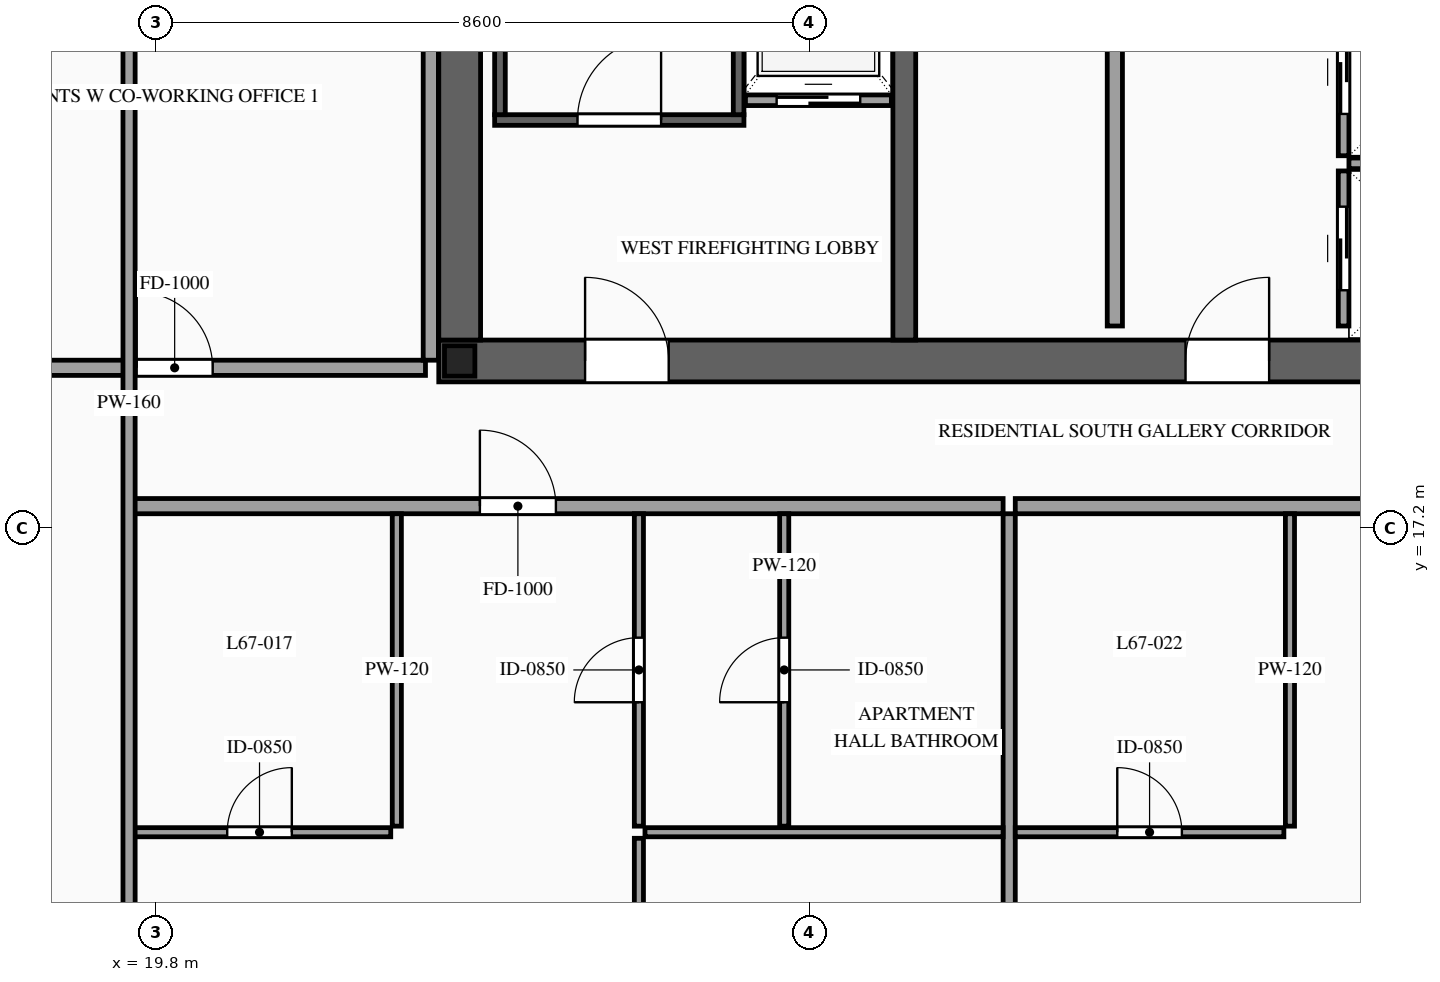
"""IFC4 building model, lengths in metres.
Left out: names, types, materials, properties, quantities, classifications, styles, units other than length and angle.
Written with IfcOpenShell. Run it as: python <this file> out.ifc"""

import sys

from ifc_helpers import new_model, si_unit, direction, frame, frame_2d, origin, origin_2d, place, context, subcontext, project, spatial, rectangle, i_section, extrude, source, transform, mapped, element, fill, save


model = new_model("IFC4")
c1 = context("Model", 3, precision=1e-05, world=origin(), true_north=direction((0.0, 1.0)))
c2 = subcontext(c1, "Body", "Model", "MODEL_VIEW")
j1 = project(units=[si_unit("LENGTHUNIT", "METRE"), si_unit("PLANEANGLEUNIT", "RADIAN")], contexts=[c1])
p1 = place(None, origin())
s1 = spatial("IfcSite", under=j1, at=p1, CompositionType="ELEMENT")
p2 = place(p1, origin())
s2 = spatial("IfcBuilding", under=s1, at=p2, CompositionType="ELEMENT")
p3 = place(p2, frame((0.0, 0.0, 252.1)))
s3 = spatial("IfcBuildingStorey", under=s2, at=p3, CompositionType="ELEMENT", Elevation=252.1)
p4 = place(p3, frame((23.525, 19.4, 0.0), z_axis=(0.0, 0.0, 1.0), x_axis=(1.0, 0.0, 0.0)))
e1 = element("IfcWall", 1, at=p4, inside=s3, PredefinedType="SHEAR", context=c2, shape_type="SweptSolid", body=[
    extrude(rectangle(XDim=26.95, YDim=0.55, at=frame_2d((13.475, 0.0))), origin(), (0.0, 0.0, 1.0), 3.5),
])
p5 = place(p4, frame((1.925, 0.0, 0.0)))
e2 = element("IfcOpeningElement", 2, at=p5, cuts=e1, PredefinedType="OPENING", context=c2, shape_type="SweptSolid", body=[
    extrude(rectangle(XDim=1.1, YDim=2.2, at=frame_2d((0.55, 1.1))), frame((0.0, 0.29, 0.0), z_axis=(0.0, -1.0, 0.0), x_axis=(1.0, 0.0, 0.0)), (0.0, 0.0, 1.0), 0.58),
])
p6 = place(p4, frame((9.825, 0.0, 0.0)))
e3 = element("IfcOpeningElement", 3, at=p6, cuts=e1, PredefinedType="OPENING", context=c2, shape_type="SweptSolid", body=[
    extrude(rectangle(XDim=1.1, YDim=2.2, at=frame_2d((0.55, 1.1))), frame((0.0, 0.29, 0.0), z_axis=(0.0, -1.0, 0.0), x_axis=(1.0, 0.0, 0.0)), (0.0, 0.0, 1.0), 0.58),
])
p7 = place(p4, frame((23.025, 0.0, 0.0)))
e4 = element("IfcOpeningElement", 4, at=p7, cuts=e1, PredefinedType="OPENING", context=c2, shape_type="SweptSolid", body=[
    extrude(rectangle(XDim=1.1, YDim=2.2, at=frame_2d((0.55, 1.1))), frame((0.0, 0.29, 0.0), z_axis=(0.0, -1.0, 0.0), x_axis=(1.0, 0.0, 0.0)), (0.0, 0.0, 1.0), 0.58),
])
p8 = place(p4, frame((19.645, 0.0, 0.0)))
e5 = element("IfcOpeningElement", 5, at=p8, cuts=e1, PredefinedType="OPENING", context=c2, shape_type="SweptSolid", body=[
    extrude(rectangle(XDim=0.9, YDim=2.15, at=frame_2d((0.45, 1.075))), frame((0.0, 0.29, 0.0), z_axis=(0.0, -1.0, 0.0), x_axis=(1.0, 0.0, 0.0)), (0.0, 0.0, 1.0), 0.58),
])
p9 = place(p4, frame((18.205, 0.0, 0.0)))
e6 = element("IfcOpeningElement", 6, at=p9, cuts=e1, PredefinedType="OPENING", context=c2, shape_type="SweptSolid", body=[
    extrude(rectangle(XDim=0.9, YDim=2.15, at=frame_2d((0.45, 1.075))), frame((0.0, 0.29, 0.0), z_axis=(0.0, -1.0, 0.0), x_axis=(1.0, 0.0, 0.0)), (0.0, 0.0, 1.0), 0.58),
])
m1 = source(origin(), c2, "Body", "SweptSolid", [
    extrude(rectangle(XDim=12.25, YDim=0.55, at=frame_2d((6.125, 0.0))), origin(), (0.0, 0.0, 1.0), 3.5),
])
p10 = place(p3, frame((23.8, 19.675, 0.0), z_axis=(0.0, 0.0, 1.0), x_axis=(0.0, 1.0, 0.0)))
e7 = element("IfcWall", 7, at=p10, inside=s3, PredefinedType="SHEAR", context=c2, shape_type="MappedRepresentation", body=[
    mapped(m1, transform((0.0, 0.0, 0.0), scale=1.0)),
])
m2 = source(origin(), c2, "Body", "SweptSolid", [
    extrude(rectangle(XDim=12.25, YDim=0.3, at=frame_2d((6.125, 0.0))), origin(), (0.0, 0.0, 1.0), 3.5),
])
p11 = place(p3, frame((29.65, 19.675, 0.0), z_axis=(0.0, 0.0, 1.0), x_axis=(0.0, 1.0, 0.0)))
e8 = element("IfcWall", 8, at=p11, inside=s3, PredefinedType="SOLIDWALL", context=c2, shape_type="MappedRepresentation", body=[
    mapped(m2, transform((0.0, 0.0, 0.0), scale=1.0)),
])
m3 = source(origin(), c2, "Body", "SweptSolid", [
    extrude(i_section(OverallWidth=0.4, OverallDepth=0.4, WebThickness=0.013, FlangeThickness=0.021, at=origin_2d()), origin(), (0.0, 0.0, 1.0), 3.5),
])
p12 = place(p3, frame((23.8, 19.4, 0.0), z_axis=(0.0, 0.0, 1.0), x_axis=(1.0, 0.0, 0.0)))
e9 = element("IfcColumn", 9, at=p12, inside=s3, PredefinedType="COLUMN", context=c2, shape_type="MappedRepresentation", body=[
    mapped(m3, transform((0.0, 0.0, 0.0), scale=1.0)),
])
p13 = place(p3, frame((27.56, 22.83, 0.0), z_axis=(0.0, 0.0, 1.0), x_axis=(1.0, 0.0, 0.0)))
e10 = element("IfcWall", 10, at=p13, inside=s3, PredefinedType="SOLIDWALL", context=c2, shape_type="SweptSolid", body=[
    extrude(rectangle(XDim=1.92, YDim=0.14, at=frame_2d((0.96, 0.0))), origin(), (0.0, 0.0, 1.0), 3.28),
])
p14 = place(p13, frame((0.41, 0.0, 0.0)))
e11 = element("IfcOpeningElement", 11, at=p14, cuts=e10, PredefinedType="OPENING", context=c2, shape_type="SweptSolid", body=[
    extrude(rectangle(XDim=1.1, YDim=2.2, at=frame_2d((0.55, 1.1))), frame((0.0, 0.085, 0.0), z_axis=(0.0, -1.0, 0.0), x_axis=(1.0, 0.0, 0.0)), (0.0, 0.0, 1.0), 0.17),
])
p15 = place(p3, frame((35.43, 19.86, 0.0), z_axis=(0.0, 0.0, 1.0), x_axis=(0.0, 1.0, 0.0)))
e12 = element("IfcWall", 12, at=p15, inside=s3, PredefinedType="SOLIDWALL", context=c2, shape_type="SweptSolid", body=[
    extrude(rectangle(XDim=2.04, YDim=0.14, at=frame_2d((1.02, 0.0))), origin(), (0.0, 0.0, 1.0), 3.28),
])
p16 = place(p15, frame((0.47, 0.0, 0.0)))
e13 = element("IfcOpeningElement", 13, at=p16, cuts=e12, PredefinedType="OPENING", context=c2, shape_type="SweptSolid", body=[
    extrude(rectangle(XDim=1.1, YDim=2.2, at=frame_2d((0.55, 1.1))), frame((0.0, 0.085, 0.0), z_axis=(0.0, -1.0, 0.0), x_axis=(1.0, 0.0, 0.0)), (0.0, 0.0, 1.0), 0.17),
])
m4 = source(origin(), c2, "Body", "SweptSolid", [
    extrude(rectangle(XDim=2.4, YDim=0.14, at=frame_2d((1.2, 0.0))), origin(), (0.0, 0.0, 1.0), 3.28),
])
p17 = place(p3, frame((35.5, 22.0, 0.0), z_axis=(0.0, 0.0, 1.0), x_axis=(1.0, 0.0, 0.0)))
e14 = element("IfcWall", 14, at=p17, inside=s3, PredefinedType="SOLIDWALL", context=c2, shape_type="MappedRepresentation", body=[
    mapped(m4, transform((0.0, 0.0, 0.0), scale=1.0)),
])
p18 = place(p3, frame((35.43, 22.1, 0.0), z_axis=(0.0, 0.0, 1.0), x_axis=(0.0, 1.0, 0.0)))
e15 = element("IfcWall", 15, at=p18, inside=s3, PredefinedType="SOLIDWALL", context=c2, shape_type="SweptSolid", body=[
    extrude(rectangle(XDim=2.2, YDim=0.14, at=frame_2d((1.1, 0.0))), origin(), (0.0, 0.0, 1.0), 3.28),
])
p19 = place(p18, frame((0.55, 0.0, 0.0)))
e16 = element("IfcOpeningElement", 16, at=p19, cuts=e15, PredefinedType="OPENING", context=c2, shape_type="SweptSolid", body=[
    extrude(rectangle(XDim=1.1, YDim=2.2, at=frame_2d((0.55, 1.1))), frame((0.0, 0.085, 0.0), z_axis=(0.0, -1.0, 0.0), x_axis=(1.0, 0.0, 0.0)), (0.0, 0.0, 1.0), 0.17),
])
p20 = place(p3, frame((24.26, 22.57, 0.0), z_axis=(0.0, 0.0, 1.0), x_axis=(1.0, 0.0, 0.0)))
e17 = element("IfcWall", 17, at=p20, inside=s3, PredefinedType="SOLIDWALL", context=c2, shape_type="SweptSolid", body=[
    extrude(rectangle(XDim=3.28, YDim=0.14, at=frame_2d((1.64, 0.0))), origin(), (0.0, 0.0, 1.0), 3.28),
])
p21 = place(p20, frame((1.09, 0.0, 0.0)))
e18 = element("IfcOpeningElement", 18, at=p21, cuts=e17, PredefinedType="OPENING", context=c2, shape_type="SweptSolid", body=[
    extrude(rectangle(XDim=1.1, YDim=2.2, at=frame_2d((0.55, 1.1))), frame((0.0, 0.085, 0.0), z_axis=(0.0, -1.0, 0.0), x_axis=(1.0, 0.0, 0.0)), (0.0, 0.0, 1.0), 0.17),
])
m5 = source(origin(), c2, "Body", "SweptSolid", [
    extrude(rectangle(XDim=8.94, YDim=0.14, at=frame_2d((4.47, 0.0))), origin(), (0.0, 0.0, 1.0), 3.28),
])
for number, where, z_axis, x_axis in (
    (19, (24.33, 22.64, 0.0), (0.0, 0.0, 1.0), (0.0, 1.0, 0.0)),
    (20, (27.47, 22.64, 0.0), (0.0, 0.0, 1.0), (0.0, 1.0, 0.0)),
):
    element("IfcWall", number, at=place(p3, frame(where, z_axis=z_axis, x_axis=x_axis)), inside=s3, PredefinedType="SOLIDWALL", context=c2, shape_type="MappedRepresentation", body=[
        mapped(m5, transform((0.0, 0.0, 0.0), scale=1.0)),
    ])
p22 = place(p3, frame((32.42, 19.86, 0.0), z_axis=(0.0, 0.0, 1.0), x_axis=(0.0, 1.0, 0.0)))
e21 = element("IfcWall", 21, at=p22, inside=s3, PredefinedType="PARTITIONING", context=c2, shape_type="SweptSolid", body=[
    extrude(rectangle(XDim=11.88, YDim=0.2, at=frame_2d((5.94, 0.0))), origin(), (0.0, 0.0, 1.0), 3.28),
])
p23 = place(p22, frame((5.49, 0.0, 0.0)))
e22 = element("IfcOpeningElement", 22, at=p23, cuts=e21, PredefinedType="OPENING", context=c2, shape_type="SweptSolid", body=[
    extrude(rectangle(XDim=0.9, YDim=2.15, at=frame_2d((0.45, 1.075))), frame((0.0, 0.115, 0.0), z_axis=(0.0, -1.0, 0.0), x_axis=(1.0, 0.0, 0.0)), (0.0, 0.0, 1.0), 0.23),
])
p24 = place(p3, frame((19.44, 17.49, 0.0), z_axis=(0.0, 0.0, 1.0), x_axis=(1.0, 0.0, 0.0)))
e23 = element("IfcWall", 23, at=p24, inside=s3, PredefinedType="PARTITIONING", context=c2, shape_type="SweptSolid", body=[
    extrude(rectangle(XDim=11.51, YDim=0.2, at=frame_2d((5.755, 0.0))), origin(), (0.0, 0.0, 1.0), 3.28),
])
p25 = place(p24, frame((4.626, 0.0, 0.0)))
e24 = element("IfcOpeningElement", 24, at=p25, cuts=e23, PredefinedType="OPENING", context=c2, shape_type="SweptSolid", body=[
    extrude(rectangle(XDim=1.0, YDim=2.2, at=frame_2d((0.5, 1.1))), frame((0.0, 0.115, 0.0), z_axis=(0.0, -1.0, 0.0), x_axis=(1.0, 0.0, 0.0)), (0.0, 0.0, 1.0), 0.23),
])
m6 = source(origin(), c2, "Body", "SweptSolid", [
    extrude(rectangle(XDim=12.04, YDim=0.16, at=frame_2d((6.02, 0.0))), origin(), (0.0, 0.0, 1.0), 3.28),
])
p26 = place(p3, frame((31.03, 5.35, 0.0), z_axis=(0.0, 0.0, 1.0), x_axis=(0.0, 1.0, 0.0)))
e25 = element("IfcWall", 25, at=p26, inside=s3, PredefinedType="PARTITIONING", context=c2, shape_type="MappedRepresentation", body=[
    mapped(m6, transform((0.0, 0.0, 0.0), scale=1.0)),
])
p27 = place(p3, frame((19.44, 13.2, 0.0), z_axis=(0.0, 0.0, 1.0), x_axis=(1.0, 0.0, 0.0)))
e26 = element("IfcWall", 26, at=p27, inside=s3, PredefinedType="PARTITIONING", context=c2, shape_type="SweptSolid", body=[
    extrude(rectangle(XDim=3.453, YDim=0.12, at=frame_2d((1.727, 0.0))), origin(), (0.0, 0.0, 1.0), 3.28),
])
p28 = place(p27, frame((1.302, 0.0, 0.0)))
e27 = element("IfcOpeningElement", 27, at=p28, cuts=e26, PredefinedType="OPENING", context=c2, shape_type="SweptSolid", body=[
    extrude(rectangle(XDim=0.85, YDim=2.1, at=frame_2d((0.425, 1.05))), frame((0.0, 0.075, 0.0), z_axis=(0.0, -1.0, 0.0), x_axis=(1.0, 0.0, 0.0)), (0.0, 0.0, 1.0), 0.15),
])
m7 = source(origin(), c2, "Body", "SweptSolid", [
    extrude(rectangle(XDim=4.11, YDim=0.12, at=frame_2d((2.055, 0.0))), origin(), (0.0, 0.0, 1.0), 3.28),
])
p29 = place(p3, frame((22.973, 13.28, 0.0), z_axis=(0.0, 0.0, 1.0), x_axis=(0.0, 1.0, 0.0)))
e28 = element("IfcWall", 28, at=p29, inside=s3, PredefinedType="PARTITIONING", context=c2, shape_type="MappedRepresentation", body=[
    mapped(m7, transform((0.0, 0.0, 0.0), scale=1.0)),
])
p30 = place(p3, frame((28.07, 13.28, 0.0), z_axis=(0.0, 0.0, 1.0), x_axis=(0.0, 1.0, 0.0)))
e29 = element("IfcWall", 29, at=p30, inside=s3, PredefinedType="PARTITIONING", context=c2, shape_type="SweptSolid", body=[
    extrude(rectangle(XDim=4.11, YDim=0.12, at=frame_2d((2.055, 0.0))), origin(), (0.0, 0.0, 1.0), 3.28),
])
p31 = place(p30, frame((1.63, 0.0, 0.0)))
e30 = element("IfcOpeningElement", 30, at=p31, cuts=e29, PredefinedType="OPENING", context=c2, shape_type="SweptSolid", body=[
    extrude(rectangle(XDim=0.85, YDim=2.1, at=frame_2d((0.425, 1.05))), frame((0.0, 0.075, 0.0), z_axis=(0.0, -1.0, 0.0), x_axis=(1.0, 0.0, 0.0)), (0.0, 0.0, 1.0), 0.15),
])
m8 = source(origin(), c2, "Body", "SweptSolid", [
    extrude(rectangle(XDim=4.712, YDim=0.12, at=frame_2d((2.356, 0.0))), origin(), (0.0, 0.0, 1.0), 3.28),
])
p32 = place(p3, frame((26.238, 13.2, 0.0), z_axis=(0.0, 0.0, 1.0), x_axis=(1.0, 0.0, 0.0)))
e31 = element("IfcWall", 31, at=p32, inside=s3, PredefinedType="PARTITIONING", context=c2, shape_type="MappedRepresentation", body=[
    mapped(m8, transform((0.0, 0.0, 0.0), scale=1.0)),
])
p33 = place(p3, frame((26.158, 5.35, 0.0), z_axis=(0.0, 0.0, 1.0), x_axis=(0.0, 1.0, 0.0)))
e32 = element("IfcWall", 32, at=p33, inside=s3, PredefinedType="PARTITIONING", context=c2, shape_type="SweptSolid", body=[
    extrude(rectangle(XDim=7.77, YDim=0.12, at=frame_2d((3.885, 0.0))), origin(), (0.0, 0.0, 1.0), 3.28),
])
p34 = place(p33, frame((3.435, 0.0, 0.0)))
e33 = element("IfcOpeningElement", 33, at=p34, cuts=e32, PredefinedType="OPENING", context=c2, shape_type="SweptSolid", body=[
    extrude(rectangle(XDim=0.9, YDim=2.15, at=frame_2d((0.45, 1.075))), frame((0.0, 0.075, 0.0), z_axis=(0.0, -1.0, 0.0), x_axis=(1.0, 0.0, 0.0)), (0.0, 0.0, 1.0), 0.15),
])
p35 = place(p3, frame((26.158, 13.28, 0.0), z_axis=(0.0, 0.0, 1.0), x_axis=(0.0, 1.0, 0.0)))
e34 = element("IfcWall", 34, at=p35, inside=s3, PredefinedType="PARTITIONING", context=c2, shape_type="SweptSolid", body=[
    extrude(rectangle(XDim=4.11, YDim=0.12, at=frame_2d((2.055, 0.0))), origin(), (0.0, 0.0, 1.0), 3.28),
])
p36 = place(p35, frame((1.63, 0.0, 0.0)))
e35 = element("IfcOpeningElement", 35, at=p36, cuts=e34, PredefinedType="OPENING", context=c2, shape_type="SweptSolid", body=[
    extrude(rectangle(XDim=0.85, YDim=2.1, at=frame_2d((0.425, 1.05))), frame((0.0, 0.075, 0.0), z_axis=(0.0, -1.0, 0.0), x_axis=(1.0, 0.0, 0.0)), (0.0, 0.0, 1.0), 0.15),
])
p37 = place(p3, frame((31.11, 17.49, 0.0), z_axis=(0.0, 0.0, 1.0), x_axis=(1.0, 0.0, 0.0)))
e36 = element("IfcWall", 36, at=p37, inside=s3, PredefinedType="PARTITIONING", context=c2, shape_type="SweptSolid", body=[
    extrude(rectangle(XDim=11.78, YDim=0.2, at=frame_2d((5.89, 0.0))), origin(), (0.0, 0.0, 1.0), 3.28),
])
p38 = place(p37, frame((4.801, 0.0, 0.0)))
e37 = element("IfcOpeningElement", 37, at=p38, cuts=e36, PredefinedType="OPENING", context=c2, shape_type="SweptSolid", body=[
    extrude(rectangle(XDim=1.0, YDim=2.2, at=frame_2d((0.5, 1.1))), frame((0.0, 0.115, 0.0), z_axis=(0.0, -1.0, 0.0), x_axis=(1.0, 0.0, 0.0)), (0.0, 0.0, 1.0), 0.23),
])
p39 = place(p3, frame((31.11, 13.2, 0.0), z_axis=(0.0, 0.0, 1.0), x_axis=(1.0, 0.0, 0.0)))
e38 = element("IfcWall", 38, at=p39, inside=s3, PredefinedType="PARTITIONING", context=c2, shape_type="SweptSolid", body=[
    extrude(rectangle(XDim=3.534, YDim=0.12, at=frame_2d((1.767, 0.0))), origin(), (0.0, 0.0, 1.0), 3.28),
])
p40 = place(p39, frame((1.342, 0.0, 0.0)))
e39 = element("IfcOpeningElement", 39, at=p40, cuts=e38, PredefinedType="OPENING", context=c2, shape_type="SweptSolid", body=[
    extrude(rectangle(XDim=0.85, YDim=2.1, at=frame_2d((0.425, 1.05))), frame((0.0, 0.075, 0.0), z_axis=(0.0, -1.0, 0.0), x_axis=(1.0, 0.0, 0.0)), (0.0, 0.0, 1.0), 0.15),
])
p41 = place(p3, frame((34.724, 13.28, 0.0), z_axis=(0.0, 0.0, 1.0), x_axis=(0.0, 1.0, 0.0)))
e40 = element("IfcWall", 40, at=p41, inside=s3, PredefinedType="PARTITIONING", context=c2, shape_type="MappedRepresentation", body=[
    mapped(m7, transform((0.0, 0.0, 0.0), scale=1.0)),
])
p42 = place(p3, frame((16.55, 19.31, 0.0), z_axis=(0.0, 0.0, 1.0), x_axis=(1.0, 0.0, 0.0)))
e41 = element("IfcWall", 41, at=p42, inside=s3, PredefinedType="PARTITIONING", context=c2, shape_type="SweptSolid", body=[
    extrude(rectangle(XDim=6.8, YDim=0.2, at=frame_2d((3.4, 0.0))), origin(), (0.0, 0.0, 1.0), 2.825),
])
p43 = place(p42, frame((3.0, 0.0, 0.0)))
e42 = element("IfcOpeningElement", 42, at=p43, cuts=e41, PredefinedType="OPENING", context=c2, shape_type="SweptSolid", body=[
    extrude(rectangle(XDim=1.0, YDim=2.2, at=frame_2d((0.5, 1.1))), frame((0.0, 0.115, 0.0), z_axis=(0.0, -1.0, 0.0), x_axis=(1.0, 0.0, 0.0)), (0.0, 0.0, 1.0), 0.23),
])
m9 = source(origin(), c2, "Body", "SweptSolid", [
    extrude(rectangle(XDim=6.29, YDim=0.2, at=frame_2d((3.145, 0.0))), origin(), (0.0, 0.0, 1.0), 3.28),
])
p44 = place(p3, frame((23.42, 19.41, 0.0), z_axis=(0.0, 0.0, 1.0), x_axis=(0.0, 1.0, 0.0)))
e43 = element("IfcWall", 43, at=p44, inside=s3, PredefinedType="PARTITIONING", context=c2, shape_type="MappedRepresentation", body=[
    mapped(m9, transform((0.0, 0.0, 0.0), scale=1.0)),
])
m10 = source(origin(), c2, "Body", "SweptSolid", [
    extrude(rectangle(XDim=26.69, YDim=0.16, at=frame_2d((13.345, 0.0))), origin(), (0.0, 0.0, 1.0), 3.28),
])
p45 = place(p3, frame((19.45, 5.5, 0.0), z_axis=(0.0, 0.0, 1.0), x_axis=(0.0, 1.0, 0.0)))
e44 = element("IfcWall", 44, at=p45, inside=s3, PredefinedType="PARTITIONING", context=c2, shape_type="MappedRepresentation", body=[
    mapped(m10, transform((0.0, 0.0, 0.0), scale=1.0)),
])
m11 = source(origin(), c2, "Body", "SweptSolid", [
    extrude(rectangle(XDim=1.1, YDim=2.2, at=frame_2d((0.55, 1.1))), frame((0.0, 0.025, 0.0), z_axis=(0.0, -1.0, 0.0), x_axis=(1.0, 0.0, 0.0)), (0.0, 0.0, 1.0), 0.05),
])
p46 = place(p14, origin())
e45 = element("IfcDoor", 45, at=p46, inside=s3, OperationType="SLIDING_TO_LEFT", PredefinedType="DOOR", context=c2, shape_type="MappedRepresentation", body=[
    mapped(m11, transform((0.0, 0.0, 0.0), scale=1.0)),
])
fill(e11, e45)
p47 = place(p16, origin())
e46 = element("IfcDoor", 46, at=p47, inside=s3, OperationType="SLIDING_TO_RIGHT", PredefinedType="DOOR", context=c2, shape_type="MappedRepresentation", body=[
    mapped(m11, transform((0.0, 0.0, 0.0), scale=1.0)),
])
fill(e13, e46)
p48 = place(p19, origin())
e47 = element("IfcDoor", 47, at=p48, inside=s3, OperationType="SLIDING_TO_LEFT", PredefinedType="DOOR", context=c2, shape_type="MappedRepresentation", body=[
    mapped(m11, transform((0.0, 0.0, 0.0), scale=1.0)),
])
fill(e16, e47)
m12 = source(origin(), c2, "Body", "SweptSolid", [
    extrude(rectangle(XDim=1.1, YDim=2.2, at=frame_2d((0.55, 1.1))), frame((0.0, 0.025, 0.0), z_axis=(0.0, -1.0, 0.0), x_axis=(1.0, 0.0, 0.0)), (0.0, 0.0, 1.0), 0.05),
])
p49 = place(p21, origin())
e48 = element("IfcDoor", 48, at=p49, inside=s3, OperationType="SINGLE_SWING_RIGHT", PredefinedType="DOOR", context=c2, shape_type="MappedRepresentation", body=[
    mapped(m12, transform((0.0, 0.0, 0.0), scale=1.0)),
])
fill(e18, e48)
p50 = place(p5, origin())
e49 = element("IfcDoor", 49, at=p50, inside=s3, OperationType="SINGLE_SWING_LEFT", PredefinedType="DOOR", context=c2, shape_type="MappedRepresentation", body=[
    mapped(m12, transform((0.0, 0.0, 0.0), scale=1.0)),
])
fill(e2, e49)
p51 = place(p6, origin())
e50 = element("IfcDoor", 50, at=p51, inside=s3, OperationType="SINGLE_SWING_RIGHT", PredefinedType="DOOR", context=c2, shape_type="MappedRepresentation", body=[
    mapped(m12, transform((0.0, 0.0, 0.0), scale=1.0)),
])
fill(e3, e50)
m13 = source(origin(), c2, "Body", "SweptSolid", [
    extrude(rectangle(XDim=1.0, YDim=2.2, at=frame_2d((0.5, 1.1))), frame((0.0, 0.025, 0.0), z_axis=(0.0, -1.0, 0.0), x_axis=(1.0, 0.0, 0.0)), (0.0, 0.0, 1.0), 0.05),
])
p52 = place(p25, origin())
e51 = element("IfcDoor", 51, at=p52, inside=s3, OperationType="SINGLE_SWING_LEFT", PredefinedType="DOOR", context=c2, shape_type="MappedRepresentation", body=[
    mapped(m13, transform((0.0, 0.0, 0.0), scale=1.0)),
])
fill(e24, e51)
m14 = source(origin(), c2, "Body", "SweptSolid", [
    extrude(rectangle(XDim=0.85, YDim=2.1, at=frame_2d((0.425, 1.05))), frame((0.0, 0.025, 0.0), z_axis=(0.0, -1.0, 0.0), x_axis=(1.0, 0.0, 0.0)), (0.0, 0.0, 1.0), 0.05),
])
p53 = place(p28, origin())
e52 = element("IfcDoor", 52, at=p53, inside=s3, OperationType="SINGLE_SWING_RIGHT", PredefinedType="DOOR", context=c2, shape_type="MappedRepresentation", body=[
    mapped(m14, transform((0.0, 0.0, 0.0), scale=1.0)),
])
fill(e27, e52)
p54 = place(p31, origin())
e53 = element("IfcDoor", 53, at=p54, inside=s3, OperationType="SINGLE_SWING_LEFT", PredefinedType="DOOR", context=c2, shape_type="MappedRepresentation", body=[
    mapped(m14, transform((0.0, 0.0, 0.0), scale=1.0)),
])
fill(e30, e53)
p55 = place(p36, origin())
e54 = element("IfcDoor", 54, at=p55, inside=s3, OperationType="SINGLE_SWING_LEFT", PredefinedType="DOOR", context=c2, shape_type="MappedRepresentation", body=[
    mapped(m14, transform((0.0, 0.0, 0.0), scale=1.0)),
])
fill(e35, e54)
p56 = place(p40, origin())
e55 = element("IfcDoor", 55, at=p56, inside=s3, OperationType="SINGLE_SWING_LEFT", PredefinedType="DOOR", context=c2, shape_type="MappedRepresentation", body=[
    mapped(m14, transform((0.0, 0.0, 0.0), scale=1.0)),
])
fill(e39, e55)
p57 = place(p43, origin())
e56 = element("IfcDoor", 56, at=p57, inside=s3, OperationType="SINGLE_SWING_LEFT", PredefinedType="DOOR", context=c2, shape_type="MappedRepresentation", body=[
    mapped(m13, transform((0.0, 0.0, 0.0), scale=1.0)),
])
fill(e42, e56)
save(model, sys.argv[1])
